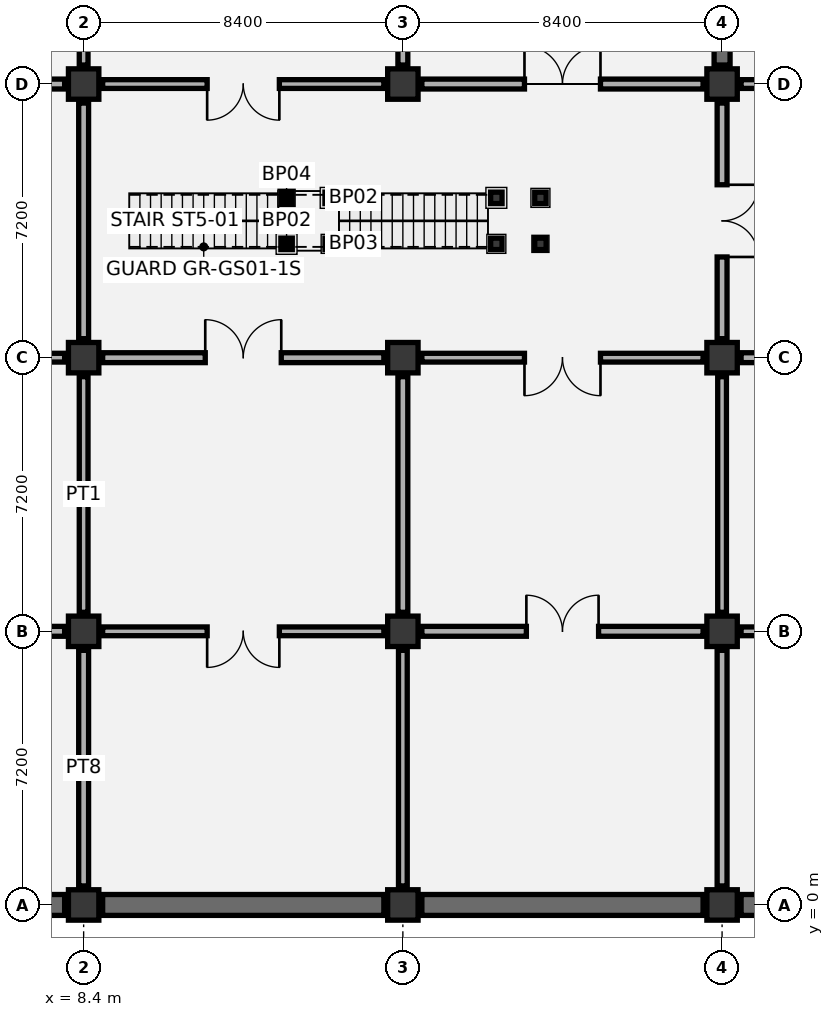
"""IFC4 building model, lengths in metres.
Left out: names, types, materials, properties, quantities, classifications, styles, units other than length and angle.
Written with IfcOpenShell. Run it as: python <this file> out.ifc"""

import sys

from ifc_helpers import new_model, si_unit, direction, frame, frame_2d, origin, origin_2d, place, context, subcontext, project, spatial, rectangle, i_section, extrude, element, fill, save


model = new_model("IFC4")
c1 = context("Model", 3, precision=1e-05, world=origin(), true_north=direction((0.0, 1.0)))
c2 = subcontext(c1, "Body", "Model", "MODEL_VIEW")
j1 = project(units=[si_unit("LENGTHUNIT", "METRE"), si_unit("PLANEANGLEUNIT", "RADIAN")], contexts=[c1])
p1 = place(None, origin())
s1 = spatial("IfcSite", under=j1, at=p1, CompositionType="ELEMENT")
p2 = place(p1, origin())
s2 = spatial("IfcBuilding", under=s1, at=p2, CompositionType="ELEMENT")
p3 = place(p2, frame((0.0, 0.0, -9.6)))
s3 = spatial("IfcBuildingStorey", under=s2, at=p3, CompositionType="ELEMENT", Elevation=-9.6)
for number, where, z_axis, x_axis in (
    (1, (8.4, 0.0, 0.0), (0.0, 0.0, 1.0), (1.0, 0.0, 0.0)),
    (2, (8.4, 7.2, 0.0), (0.0, 0.0, 1.0), (1.0, 0.0, 0.0)),
    (3, (8.4, 14.4, 0.0), (0.0, 0.0, 1.0), (1.0, 0.0, 0.0)),
    (4, (8.4, 21.6, 0.0), (0.0, 0.0, 1.0), (1.0, 0.0, 0.0)),
    (5, (16.8, 0.0, 0.0), (0.0, 0.0, 1.0), (1.0, 0.0, 0.0)),
    (6, (16.8, 7.2, 0.0), (0.0, 0.0, 1.0), (1.0, 0.0, 0.0)),
    (7, (16.8, 14.4, 0.0), (0.0, 0.0, 1.0), (1.0, 0.0, 0.0)),
    (8, (16.8, 21.6, 0.0), (0.0, 0.0, 1.0), (1.0, 0.0, 0.0)),
    (9, (25.2, 0.0, 0.0), (0.0, 0.0, 1.0), (1.0, 0.0, 0.0)),
    (10, (25.2, 7.2, 0.0), (0.0, 0.0, 1.0), (1.0, 0.0, 0.0)),
    (11, (25.2, 14.4, 0.0), (0.0, 0.0, 1.0), (1.0, 0.0, 0.0)),
    (12, (25.2, 21.6, 0.0), (0.0, 0.0, 1.0), (1.0, 0.0, 0.0)),
):
    element("IfcColumn", number, at=place(p3, frame(where, z_axis=z_axis, x_axis=x_axis)), inside=s3, PredefinedType="COLUMN", context=c2, shape_type="SweptSolid", body=[
        extrude(rectangle(XDim=0.8, YDim=0.8, at=origin_2d()), origin(), (0.0, 0.0, 1.0), 4.8),
    ])
for number, where, z_axis, x_axis in (
    (13, (13.74, 17.395, 0.0), (0.0, 0.0, 1.0), (1.0, 0.0, 0.0)),
    (14, (14.9, 17.395, 0.0), (0.0, 0.0, 1.0), (1.0, 0.0, 0.0)),
    (15, (13.74, 18.605, 0.0), (0.0, 0.0, 1.0), (1.0, 0.0, 0.0)),
    (16, (14.9, 18.605, 0.0), (0.0, 0.0, 1.0), (1.0, 0.0, 0.0)),
):
    element("IfcColumn", number, at=place(p3, frame(where, z_axis=z_axis, x_axis=x_axis)), inside=s3, PredefinedType="COLUMN", context=c2, shape_type="SweptSolid", body=[
        extrude(i_section(OverallWidth=0.3, OverallDepth=0.3, WebThickness=0.011, FlangeThickness=0.019, FilletRadius=0.027, at=origin_2d()), origin(), (0.0, 0.0, 1.0), 2.22),
    ])
for number, where, z_axis, x_axis in (
    (17, (19.26, 17.395, 0.0), (0.0, 0.0, 1.0), (1.0, 0.0, 0.0)),
    (18, (20.42, 17.395, 0.0), (0.0, 0.0, 1.0), (1.0, 0.0, 0.0)),
    (19, (19.26, 18.605, 0.0), (0.0, 0.0, 1.0), (1.0, 0.0, 0.0)),
    (20, (20.42, 18.605, 0.0), (0.0, 0.0, 1.0), (1.0, 0.0, 0.0)),
):
    element("IfcColumn", number, at=place(p3, frame(where, z_axis=z_axis, x_axis=x_axis)), inside=s3, PredefinedType="COLUMN", context=c2, shape_type="SweptSolid", body=[
        extrude(i_section(OverallWidth=0.3, OverallDepth=0.3, WebThickness=0.011, FlangeThickness=0.019, FilletRadius=0.027, at=origin_2d()), origin(), (0.0, 0.0, 1.0), 4.6),
    ])
p4 = place(p3, frame((0.5, 0.0, 0.0), z_axis=(0.0, 0.0, 1.0), x_axis=(1.0, 0.0, 0.0)))
e21 = element("IfcWall", 21, at=p4, inside=s3, PredefinedType="USERDEFINED", context=c2, shape_type="SweptSolid", body=[
    extrude(rectangle(XDim=7.4, YDim=0.55, at=frame_2d((3.7, 0.0))), origin(), (0.0, 0.0, 1.0), 4.4),
])
p5 = place(p3, frame((8.9, 0.0, 0.0), z_axis=(0.0, 0.0, 1.0), x_axis=(1.0, 0.0, 0.0)))
e22 = element("IfcWall", 22, at=p5, inside=s3, PredefinedType="USERDEFINED", context=c2, shape_type="SweptSolid", body=[
    extrude(rectangle(XDim=7.4, YDim=0.55, at=frame_2d((3.7, 0.0))), origin(), (0.0, 0.0, 1.0), 4.4),
])
p6 = place(p3, frame((17.3, 0.0, 0.0), z_axis=(0.0, 0.0, 1.0), x_axis=(1.0, 0.0, 0.0)))
e23 = element("IfcWall", 23, at=p6, inside=s3, PredefinedType="USERDEFINED", context=c2, shape_type="SweptSolid", body=[
    extrude(rectangle(XDim=7.4, YDim=0.55, at=frame_2d((3.7, 0.0))), origin(), (0.0, 0.0, 1.0), 4.4),
])
p7 = place(p3, frame((25.7, 0.0, 0.0), z_axis=(0.0, 0.0, 1.0), x_axis=(1.0, 0.0, 0.0)))
e24 = element("IfcWall", 24, at=p7, inside=s3, PredefinedType="USERDEFINED", context=c2, shape_type="SweptSolid", body=[
    extrude(rectangle(XDim=7.4, YDim=0.55, at=frame_2d((3.7, 0.0))), origin(), (0.0, 0.0, 1.0), 4.4),
])
p8 = place(p3, frame((25.2, 22.1, 0.0), z_axis=(0.0, 0.0, 1.0), x_axis=(0.0, 1.0, 0.0)))
e25 = element("IfcWall", 25, at=p8, inside=s3, PredefinedType="SHEAR", context=c2, shape_type="SweptSolid", body=[
    extrude(rectangle(XDim=13.4, YDim=0.42, at=frame_2d((6.7, 0.0))), origin(), (0.0, 0.0, 1.0), 3.9),
])
p9 = place(p3, frame((8.4, 0.5, 0.0), z_axis=(0.0, 0.0, 1.0), x_axis=(0.0, 1.0, 0.0)))
e26 = element("IfcWall", 26, at=p9, inside=s3, PredefinedType="PARTITIONING", context=c2, shape_type="SweptSolid", body=[
    extrude(rectangle(XDim=6.2, YDim=0.26, at=frame_2d((3.1, 0.0))), origin(), (0.0, 0.0, 1.0), 3.595),
])
p10 = place(p3, frame((0.5, 7.2, 0.0), z_axis=(0.0, 0.0, 1.0), x_axis=(1.0, 0.0, 0.0)))
e27 = element("IfcWall", 27, at=p10, inside=s3, PredefinedType="PARTITIONING", context=c2, shape_type="SweptSolid", body=[
    extrude(rectangle(XDim=7.4, YDim=0.26, at=frame_2d((3.7, 0.0))), origin(), (0.0, 0.0, 1.0), 3.495),
])
p11 = place(p10, frame((2.7, 0.0, 0.0)))
e28 = element("IfcOpeningElement", 28, at=p11, cuts=e27, PredefinedType="OPENING", context=c2, shape_type="SweptSolid", body=[
    extrude(rectangle(XDim=2.0, YDim=2.35, at=frame_2d((1.0, 1.175))), frame((0.0, 0.14, 0.0), z_axis=(0.0, -1.0, 0.0), x_axis=(1.0, 0.0, 0.0)), (0.0, 0.0, 1.0), 0.28),
])
p12 = place(p3, frame((8.4, 7.7, 0.0), z_axis=(0.0, 0.0, 1.0), x_axis=(0.0, 1.0, 0.0)))
e29 = element("IfcWall", 29, at=p12, inside=s3, PredefinedType="PARTITIONING", context=c2, shape_type="SweptSolid", body=[
    extrude(rectangle(XDim=6.2, YDim=0.23, at=frame_2d((3.1, 0.0))), origin(), (0.0, 0.0, 1.0), 3.595),
])
p13 = place(p3, frame((0.5, 14.4, 0.0), z_axis=(0.0, 0.0, 1.0), x_axis=(1.0, 0.0, 0.0)))
e30 = element("IfcWall", 30, at=p13, inside=s3, PredefinedType="PARTITIONING", context=c2, shape_type="SweptSolid", body=[
    extrude(rectangle(XDim=7.4, YDim=0.23, at=frame_2d((3.7, 0.0))), origin(), (0.0, 0.0, 1.0), 3.495),
])
p14 = place(p13, frame((2.75, 0.0, 0.0)))
e31 = element("IfcOpeningElement", 31, at=p14, cuts=e30, PredefinedType="OPENING", context=c2, shape_type="SweptSolid", body=[
    extrude(rectangle(XDim=1.9, YDim=2.3, at=frame_2d((0.95, 1.15))), frame((0.0, 0.125, 0.0), z_axis=(0.0, -1.0, 0.0), x_axis=(1.0, 0.0, 0.0)), (0.0, 0.0, 1.0), 0.25),
])
p15 = place(p3, frame((8.4, 14.9, 0.0), z_axis=(0.0, 0.0, 1.0), x_axis=(0.0, 1.0, 0.0)))
e32 = element("IfcWall", 32, at=p15, inside=s3, PredefinedType="PARTITIONING", context=c2, shape_type="SweptSolid", body=[
    extrude(rectangle(XDim=6.2, YDim=0.26, at=frame_2d((3.1, 0.0))), origin(), (0.0, 0.0, 1.0), 3.595),
])
p16 = place(p3, frame((0.5, 21.6, 0.0), z_axis=(0.0, 0.0, 1.0), x_axis=(1.0, 0.0, 0.0)))
e33 = element("IfcWall", 33, at=p16, inside=s3, PredefinedType="PARTITIONING", context=c2, shape_type="SweptSolid", body=[
    extrude(rectangle(XDim=7.4, YDim=0.26, at=frame_2d((3.7, 0.0))), origin(), (0.0, 0.0, 1.0), 3.495),
])
p17 = place(p16, frame((2.7, 0.0, 0.0)))
e34 = element("IfcOpeningElement", 34, at=p17, cuts=e33, PredefinedType="OPENING", context=c2, shape_type="SweptSolid", body=[
    extrude(rectangle(XDim=2.0, YDim=2.35, at=frame_2d((1.0, 1.175))), frame((0.0, 0.14, 0.0), z_axis=(0.0, -1.0, 0.0), x_axis=(1.0, 0.0, 0.0)), (0.0, 0.0, 1.0), 0.28),
])
for number, where, z_axis, x_axis in (
    (35, (8.4, 22.1, 0.0), (0.0, 0.0, 1.0), (0.0, 1.0, 0.0)),
    (36, (16.8, 0.5, 0.0), (0.0, 0.0, 1.0), (0.0, 1.0, 0.0)),
):
    element("IfcWall", number, at=place(p3, frame(where, z_axis=z_axis, x_axis=x_axis)), inside=s3, PredefinedType="PARTITIONING", context=c2, shape_type="SweptSolid", body=[
        extrude(rectangle(XDim=6.2, YDim=0.23, at=frame_2d((3.1, 0.0))), origin(), (0.0, 0.0, 1.0), 3.595),
    ])
p18 = place(p3, frame((8.9, 7.2, 0.0), z_axis=(0.0, 0.0, 1.0), x_axis=(1.0, 0.0, 0.0)))
e37 = element("IfcWall", 37, at=p18, inside=s3, PredefinedType="PARTITIONING", context=c2, shape_type="SweptSolid", body=[
    extrude(rectangle(XDim=7.4, YDim=0.23, at=frame_2d((3.7, 0.0))), origin(), (0.0, 0.0, 1.0), 3.495),
])
p19 = place(p18, frame((2.75, 0.0, 0.0)))
e38 = element("IfcOpeningElement", 38, at=p19, cuts=e37, PredefinedType="OPENING", context=c2, shape_type="SweptSolid", body=[
    extrude(rectangle(XDim=1.9, YDim=2.3, at=frame_2d((0.95, 1.15))), frame((0.0, 0.125, 0.0), z_axis=(0.0, -1.0, 0.0), x_axis=(1.0, 0.0, 0.0)), (0.0, 0.0, 1.0), 0.25),
])
p20 = place(p3, frame((16.8, 7.7, 0.0), z_axis=(0.0, 0.0, 1.0), x_axis=(0.0, 1.0, 0.0)))
e39 = element("IfcWall", 39, at=p20, inside=s3, PredefinedType="PARTITIONING", context=c2, shape_type="SweptSolid", body=[
    extrude(rectangle(XDim=6.2, YDim=0.26, at=frame_2d((3.1, 0.0))), origin(), (0.0, 0.0, 1.0), 3.595),
])
p21 = place(p3, frame((8.9, 14.4, 0.0), z_axis=(0.0, 0.0, 1.0), x_axis=(1.0, 0.0, 0.0)))
e40 = element("IfcWall", 40, at=p21, inside=s3, PredefinedType="PARTITIONING", context=c2, shape_type="SweptSolid", body=[
    extrude(rectangle(XDim=7.4, YDim=0.26, at=frame_2d((3.7, 0.0))), origin(), (0.0, 0.0, 1.0), 3.495),
])
p22 = place(p21, frame((2.7, 0.0, 0.0)))
e41 = element("IfcOpeningElement", 41, at=p22, cuts=e40, PredefinedType="OPENING", context=c2, shape_type="SweptSolid", body=[
    extrude(rectangle(XDim=2.0, YDim=2.35, at=frame_2d((1.0, 1.175))), frame((0.0, 0.14, 0.0), z_axis=(0.0, -1.0, 0.0), x_axis=(1.0, 0.0, 0.0)), (0.0, 0.0, 1.0), 0.28),
])
p23 = place(p3, frame((8.9, 21.6, 0.0), z_axis=(0.0, 0.0, 1.0), x_axis=(1.0, 0.0, 0.0)))
e42 = element("IfcWall", 42, at=p23, inside=s3, PredefinedType="PARTITIONING", context=c2, shape_type="SweptSolid", body=[
    extrude(rectangle(XDim=7.4, YDim=0.23, at=frame_2d((3.7, 0.0))), origin(), (0.0, 0.0, 1.0), 3.495),
])
p24 = place(p23, frame((2.75, 0.0, 0.0)))
e43 = element("IfcOpeningElement", 43, at=p24, cuts=e42, PredefinedType="OPENING", context=c2, shape_type="SweptSolid", body=[
    extrude(rectangle(XDim=1.9, YDim=2.3, at=frame_2d((0.95, 1.15))), frame((0.0, 0.125, 0.0), z_axis=(0.0, -1.0, 0.0), x_axis=(1.0, 0.0, 0.0)), (0.0, 0.0, 1.0), 0.25),
])
p25 = place(p3, frame((16.8, 22.1, 0.0), z_axis=(0.0, 0.0, 1.0), x_axis=(0.0, 1.0, 0.0)))
e44 = element("IfcWall", 44, at=p25, inside=s3, PredefinedType="PARTITIONING", context=c2, shape_type="SweptSolid", body=[
    extrude(rectangle(XDim=6.2, YDim=0.26, at=frame_2d((3.1, 0.0))), origin(), (0.0, 0.0, 1.0), 3.095),
])
p26 = place(p3, frame((25.2, 0.5, 0.0), z_axis=(0.0, 0.0, 1.0), x_axis=(0.0, 1.0, 0.0)))
e45 = element("IfcWall", 45, at=p26, inside=s3, PredefinedType="PARTITIONING", context=c2, shape_type="SweptSolid", body=[
    extrude(rectangle(XDim=6.2, YDim=0.26, at=frame_2d((3.1, 0.0))), origin(), (0.0, 0.0, 1.0), 3.595),
])
p27 = place(p3, frame((17.3, 7.2, 0.0), z_axis=(0.0, 0.0, 1.0), x_axis=(1.0, 0.0, 0.0)))
e46 = element("IfcWall", 46, at=p27, inside=s3, PredefinedType="PARTITIONING", context=c2, shape_type="SweptSolid", body=[
    extrude(rectangle(XDim=7.4, YDim=0.26, at=frame_2d((3.7, 0.0))), origin(), (0.0, 0.0, 1.0), 3.495),
])
p28 = place(p27, frame((2.75, 0.0, 0.0)))
e47 = element("IfcOpeningElement", 47, at=p28, cuts=e46, PredefinedType="OPENING", context=c2, shape_type="SweptSolid", body=[
    extrude(rectangle(XDim=1.9, YDim=2.3, at=frame_2d((0.95, 1.15))), frame((0.0, 0.14, 0.0), z_axis=(0.0, -1.0, 0.0), x_axis=(1.0, 0.0, 0.0)), (0.0, 0.0, 1.0), 0.28),
])
p29 = place(p3, frame((25.2, 7.7, 0.0), z_axis=(0.0, 0.0, 1.0), x_axis=(0.0, 1.0, 0.0)))
e48 = element("IfcWall", 48, at=p29, inside=s3, PredefinedType="PARTITIONING", context=c2, shape_type="SweptSolid", body=[
    extrude(rectangle(XDim=6.2, YDim=0.23, at=frame_2d((3.1, 0.0))), origin(), (0.0, 0.0, 1.0), 3.595),
])
p30 = place(p3, frame((17.3, 14.4, 0.0), z_axis=(0.0, 0.0, 1.0), x_axis=(1.0, 0.0, 0.0)))
e49 = element("IfcWall", 49, at=p30, inside=s3, PredefinedType="PARTITIONING", context=c2, shape_type="SweptSolid", body=[
    extrude(rectangle(XDim=7.4, YDim=0.23, at=frame_2d((3.7, 0.0))), origin(), (0.0, 0.0, 1.0), 3.495),
])
p31 = place(p30, frame((2.7, 0.0, 0.0)))
e50 = element("IfcOpeningElement", 50, at=p31, cuts=e49, PredefinedType="OPENING", context=c2, shape_type="SweptSolid", body=[
    extrude(rectangle(XDim=2.0, YDim=2.35, at=frame_2d((1.0, 1.175))), frame((0.0, 0.125, 0.0), z_axis=(0.0, -1.0, 0.0), x_axis=(1.0, 0.0, 0.0)), (0.0, 0.0, 1.0), 0.25),
])
p32 = place(p3, frame((25.2, 14.9, 0.0), z_axis=(0.0, 0.0, 1.0), x_axis=(0.0, 1.0, 0.0)))
e51 = element("IfcWall", 51, at=p32, inside=s3, PredefinedType="PARTITIONING", context=c2, shape_type="SweptSolid", body=[
    extrude(rectangle(XDim=6.2, YDim=0.26, at=frame_2d((3.1, 0.0))), origin(), (0.0, 0.0, 1.0), 3.595),
])
p33 = place(p32, frame((2.15, 0.0, 0.0)))
e52 = element("IfcOpeningElement", 52, at=p33, cuts=e51, PredefinedType="OPENING", context=c2, shape_type="SweptSolid", body=[
    extrude(rectangle(XDim=1.9, YDim=2.3, at=frame_2d((0.95, 1.15))), frame((0.0, 0.14, 0.0), z_axis=(0.0, -1.0, 0.0), x_axis=(1.0, 0.0, 0.0)), (0.0, 0.0, 1.0), 0.28),
])
p34 = place(p3, frame((17.3, 21.6, 0.0), z_axis=(0.0, 0.0, 1.0), x_axis=(1.0, 0.0, 0.0)))
e53 = element("IfcWall", 53, at=p34, inside=s3, PredefinedType="PARTITIONING", context=c2, shape_type="SweptSolid", body=[
    extrude(rectangle(XDim=7.4, YDim=0.26, at=frame_2d((3.7, 0.0))), origin(), (0.0, 0.0, 1.0), 2.995),
])
p35 = place(p34, frame((2.7, 0.0, 0.0)))
e54 = element("IfcOpeningElement", 54, at=p35, cuts=e53, PredefinedType="OPENING", context=c2, shape_type="SweptSolid", body=[
    extrude(rectangle(XDim=2.0, YDim=2.35, at=frame_2d((1.0, 1.175))), frame((0.0, 0.14, 0.0), z_axis=(0.0, -1.0, 0.0), x_axis=(1.0, 0.0, 0.0)), (0.0, 0.0, 1.0), 0.28),
])
p36 = place(p3, frame((25.7, 7.2, 0.0), z_axis=(0.0, 0.0, 1.0), x_axis=(1.0, 0.0, 0.0)))
e55 = element("IfcWall", 55, at=p36, inside=s3, PredefinedType="PARTITIONING", context=c2, shape_type="SweptSolid", body=[
    extrude(rectangle(XDim=7.4, YDim=0.23, at=frame_2d((3.7, 0.0))), origin(), (0.0, 0.0, 1.0), 3.495),
])
p37 = place(p36, frame((2.7, 0.0, 0.0)))
e56 = element("IfcOpeningElement", 56, at=p37, cuts=e55, PredefinedType="OPENING", context=c2, shape_type="SweptSolid", body=[
    extrude(rectangle(XDim=2.0, YDim=2.35, at=frame_2d((1.0, 1.175))), frame((0.0, 0.125, 0.0), z_axis=(0.0, -1.0, 0.0), x_axis=(1.0, 0.0, 0.0)), (0.0, 0.0, 1.0), 0.25),
])
p38 = place(p3, frame((25.7, 14.4, 0.0), z_axis=(0.0, 0.0, 1.0), x_axis=(1.0, 0.0, 0.0)))
e57 = element("IfcWall", 57, at=p38, inside=s3, PredefinedType="PARTITIONING", context=c2, shape_type="SweptSolid", body=[
    extrude(rectangle(XDim=7.4, YDim=0.26, at=frame_2d((3.7, 0.0))), origin(), (0.0, 0.0, 1.0), 3.495),
])
p39 = place(p38, frame((2.75, 0.0, 0.0)))
e58 = element("IfcOpeningElement", 58, at=p39, cuts=e57, PredefinedType="OPENING", context=c2, shape_type="SweptSolid", body=[
    extrude(rectangle(XDim=1.9, YDim=2.3, at=frame_2d((0.95, 1.15))), frame((0.0, 0.14, 0.0), z_axis=(0.0, -1.0, 0.0), x_axis=(1.0, 0.0, 0.0)), (0.0, 0.0, 1.0), 0.28),
])
p40 = place(p3, frame((25.7, 21.6, 0.0), z_axis=(0.0, 0.0, 1.0), x_axis=(1.0, 0.0, 0.0)))
e59 = element("IfcWall", 59, at=p40, inside=s3, PredefinedType="PARTITIONING", context=c2, shape_type="SweptSolid", body=[
    extrude(rectangle(XDim=7.4, YDim=0.23, at=frame_2d((3.7, 0.0))), origin(), (0.0, 0.0, 1.0), 2.995),
])
p41 = place(p40, frame((2.7, 0.0, 0.0)))
e60 = element("IfcOpeningElement", 60, at=p41, cuts=e59, PredefinedType="OPENING", context=c2, shape_type="SweptSolid", body=[
    extrude(rectangle(XDim=2.0, YDim=2.35, at=frame_2d((1.0, 1.175))), frame((0.0, 0.125, 0.0), z_axis=(0.0, -1.0, 0.0), x_axis=(1.0, 0.0, 0.0)), (0.0, 0.0, 1.0), 0.25),
])
p42 = place(p19, frame((1.9, 0.0, 0.0), z_axis=(0.0, 0.0, 1.0), x_axis=(-1.0, 0.0, 0.0)))
e61 = element("IfcDoor", 61, at=p42, inside=s3, OperationType="DOUBLE_DOOR_SINGLE_SWING", PredefinedType="DOOR", context=c2, shape_type="SweptSolid", body=[
    extrude(rectangle(XDim=1.9, YDim=2.3, at=frame_2d((0.95, 1.15))), frame((0.0, 0.025, 0.0), z_axis=(0.0, -1.0, 0.0), x_axis=(1.0, 0.0, 0.0)), (0.0, 0.0, 1.0), 0.05),
])
fill(e38, e61)
p43 = place(p22, origin())
e62 = element("IfcDoor", 62, at=p43, inside=s3, OperationType="DOUBLE_DOOR_SINGLE_SWING", PredefinedType="DOOR", context=c2, shape_type="SweptSolid", body=[
    extrude(rectangle(XDim=2.0, YDim=2.35, at=frame_2d((1.0, 1.175))), frame((0.0, 0.025, 0.0), z_axis=(0.0, -1.0, 0.0), x_axis=(1.0, 0.0, 0.0)), (0.0, 0.0, 1.0), 0.05),
])
fill(e41, e62)
p44 = place(p24, frame((1.9, 0.0, 0.0), z_axis=(0.0, 0.0, 1.0), x_axis=(-1.0, 0.0, 0.0)))
e63 = element("IfcDoor", 63, at=p44, inside=s3, OperationType="DOUBLE_DOOR_SINGLE_SWING", PredefinedType="DOOR", context=c2, shape_type="SweptSolid", body=[
    extrude(rectangle(XDim=1.9, YDim=2.3, at=frame_2d((0.95, 1.15))), frame((0.0, 0.025, 0.0), z_axis=(0.0, -1.0, 0.0), x_axis=(1.0, 0.0, 0.0)), (0.0, 0.0, 1.0), 0.05),
])
fill(e43, e63)
p45 = place(p28, origin())
e64 = element("IfcDoor", 64, at=p45, inside=s3, OperationType="DOUBLE_DOOR_SINGLE_SWING", PredefinedType="DOOR", context=c2, shape_type="SweptSolid", body=[
    extrude(rectangle(XDim=1.9, YDim=2.3, at=frame_2d((0.95, 1.15))), frame((0.0, 0.025, 0.0), z_axis=(0.0, -1.0, 0.0), x_axis=(1.0, 0.0, 0.0)), (0.0, 0.0, 1.0), 0.05),
])
fill(e47, e64)
p46 = place(p31, frame((2.0, 0.0, 0.0), z_axis=(0.0, 0.0, 1.0), x_axis=(-1.0, 0.0, 0.0)))
e65 = element("IfcDoor", 65, at=p46, inside=s3, OperationType="DOUBLE_DOOR_SINGLE_SWING", PredefinedType="DOOR", context=c2, shape_type="SweptSolid", body=[
    extrude(rectangle(XDim=2.0, YDim=2.35, at=frame_2d((1.0, 1.175))), frame((0.0, 0.025, 0.0), z_axis=(0.0, -1.0, 0.0), x_axis=(1.0, 0.0, 0.0)), (0.0, 0.0, 1.0), 0.05),
])
fill(e50, e65)
p47 = place(p33, frame((1.9, 0.0, 0.0), z_axis=(0.0, 0.0, 1.0), x_axis=(-1.0, 0.0, 0.0)))
e66 = element("IfcDoor", 66, at=p47, inside=s3, OperationType="DOUBLE_DOOR_SINGLE_SWING", PredefinedType="DOOR", context=c2, shape_type="SweptSolid", body=[
    extrude(rectangle(XDim=1.9, YDim=2.3, at=frame_2d((0.95, 1.15))), frame((0.0, 0.025, 0.0), z_axis=(0.0, -1.0, 0.0), x_axis=(1.0, 0.0, 0.0)), (0.0, 0.0, 1.0), 0.05),
])
fill(e52, e66)
p48 = place(p35, origin())
e67 = element("IfcDoor", 67, at=p48, inside=s3, OperationType="DOUBLE_DOOR_SINGLE_SWING", PredefinedType="DOOR", context=c2, shape_type="SweptSolid", body=[
    extrude(rectangle(XDim=2.0, YDim=2.35, at=frame_2d((1.0, 1.175))), frame((0.0, 0.025, 0.0), z_axis=(0.0, -1.0, 0.0), x_axis=(1.0, 0.0, 0.0)), (0.0, 0.0, 1.0), 0.05),
])
fill(e54, e67)
save(model, sys.argv[1])
